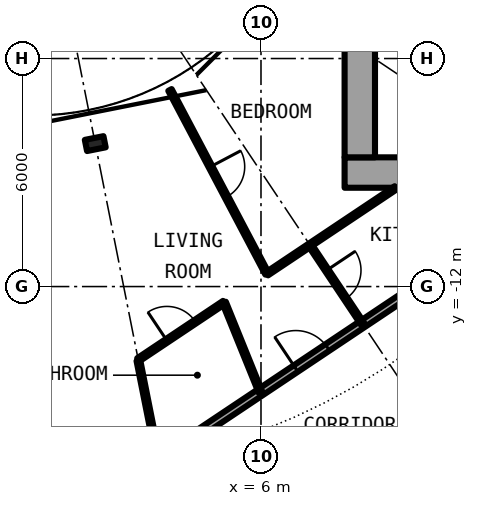
"""IFC4 building model, lengths in metres.
Left out: names, types, materials, properties, quantities, classifications, styles, units other than length and angle.
Written with IfcOpenShell. Run it as: python <this file> out.ifc"""

import sys

from ifc_helpers import new_model, si_unit, direction, frame, frame_2d, origin, origin_2d, place, context, subcontext, project, spatial, rectangle, i_section, extrude, element, fill, save


model = new_model("IFC4")
c1 = context("Model", 3, precision=1e-05, world=origin(), true_north=direction((0.0, 1.0)))
c2 = subcontext(c1, "Body", "Model", "MODEL_VIEW")
j1 = project(units=[si_unit("LENGTHUNIT", "METRE"), si_unit("PLANEANGLEUNIT", "RADIAN")], contexts=[c1])
p1 = place(None, origin())
s1 = spatial("IfcSite", under=j1, at=p1, CompositionType="ELEMENT")
p2 = place(p1, origin())
s2 = spatial("IfcBuilding", under=s1, at=p2, CompositionType="ELEMENT")
p3 = place(p2, frame((0.0, 0.0, 31.95)))
s3 = spatial("IfcBuildingStorey", under=s2, at=p3, CompositionType="ELEMENT", Elevation=31.95)
p4 = place(p3, frame((1.639, -8.239, 0.0), z_axis=(0.0, 0.0, 1.0), x_axis=(0.195090322016, -0.980785280403, 0.0)))
e1 = element("IfcColumn", 1, at=p4, inside=s3, PredefinedType="COLUMN", context=c2, shape_type="SweptSolid", body=[
    extrude(i_section(OverallWidth=0.3, OverallDepth=0.5, WebThickness=0.014, FlangeThickness=0.028, FilletRadius=0.027, at=origin_2d()), origin(), (0.0, 0.0, 1.0), 3.05),
])
p5 = place(p3, frame((8.2, -9.0, 0.0), z_axis=(0.0, 0.0, 1.0), x_axis=(1.0, 0.0, 0.0)))
e2 = element("IfcWall", 2, at=p5, inside=s3, PredefinedType="SHEAR", context=c2, shape_type="SweptSolid", body=[
    extrude(rectangle(XDim=14.2, YDim=0.8, at=frame_2d((7.1, 0.0))), origin(), (0.0, 0.0, 1.0), 3.05),
])
p6 = place(p5, frame((11.675, 0.0, 0.0)))
e3 = element("IfcOpeningElement", 3, at=p6, cuts=e2, PredefinedType="OPENING", context=c2, shape_type="SweptSolid", body=[
    extrude(rectangle(XDim=1.2, YDim=2.3, at=frame_2d((0.6, 1.15))), frame((0.0, 0.41, 0.0), z_axis=(0.0, -1.0, 0.0), x_axis=(1.0, 0.0, 0.0)), (0.0, 0.0, 1.0), 0.82),
])
p7 = place(p3, frame((8.6, -8.6, 0.0), z_axis=(0.0, 0.0, 1.0), x_axis=(0.0, 1.0, 0.0)))
e4 = element("IfcWall", 4, at=p7, inside=s3, PredefinedType="SHEAR", context=c2, shape_type="SweptSolid", body=[
    extrude(rectangle(XDim=17.2, YDim=0.8, at=frame_2d((8.6, 0.0))), origin(), (0.0, 0.0, 1.0), 3.05),
])
p8 = place(p7, frame((7.4, 0.0, 0.1)))
e5 = element("IfcOpeningElement", 5, at=p8, cuts=e4, PredefinedType="OPENING", context=c2, shape_type="SweptSolid", body=[
    extrude(rectangle(XDim=2.4, YDim=2.2, at=frame_2d((1.2, 1.1))), frame((0.0, 0.41, 0.0), z_axis=(0.0, -1.0, 0.0), x_axis=(1.0, 0.0, 0.0)), (0.0, 0.0, 1.0), 0.82),
])
p9 = place(p3, frame((9.239, -17.286, 0.0), z_axis=(0.0, 0.0, 1.0), x_axis=(0.74089212117, 0.671624050186, 0.0)))
e6 = element("IfcWall", 6, at=p9, inside=s3, PredefinedType="PARTITIONING", context=c2, shape_type="SweptSolid", body=[
    extrude(rectangle(XDim=9.368, YDim=0.2, at=frame_2d((4.684, 0.0))), origin(), (0.0, 0.0, 1.0), 2.38),
])
p10 = place(p9, frame((5.215, 0.0, 0.0)))
e7 = element("IfcOpeningElement", 7, at=p10, cuts=e6, PredefinedType="OPENING", context=c2, shape_type="SweptSolid", body=[
    extrude(rectangle(XDim=1.0, YDim=2.3, at=frame_2d((0.5, 1.15))), frame((0.0, 0.11, 0.0), z_axis=(0.0, -1.0, 0.0), x_axis=(1.0, 0.0, 0.0)), (0.0, 0.0, 1.0), 0.22),
])
p11 = place(p3, frame((3.297, -16.575, 0.0), z_axis=(0.0, 0.0, 1.0), x_axis=(0.831561346449, 0.555432918625, 0.0)))
e8 = element("IfcWall", 8, at=p11, inside=s3, PredefinedType="PARTITIONING", context=c2, shape_type="SweptSolid", body=[
    extrude(rectangle(XDim=12.914, YDim=0.2, at=frame_2d((6.457, 0.0))), origin(), (0.0, 0.0, 1.0), 2.7),
])
p12 = place(p11, frame((4.352, 0.0, 0.0)))
e9 = element("IfcOpeningElement", 9, at=p12, cuts=e8, PredefinedType="OPENING", context=c2, shape_type="SweptSolid", body=[
    extrude(rectangle(XDim=1.0, YDim=2.3, at=frame_2d((0.5, 1.15))), frame((0.0, 0.11, 0.0), z_axis=(0.0, -1.0, 0.0), x_axis=(1.0, 0.0, 0.0)), (0.0, 0.0, 1.0), 0.22),
])
p13 = place(p3, frame((2.77, -13.927, 0.0), z_axis=(0.0, 0.0, 1.0), x_axis=(0.831538390496, 0.555467285384, 0.0)))
e10 = element("IfcWall", 10, at=p13, inside=s3, PredefinedType="PARTITIONING", context=c2, shape_type="SweptSolid", body=[
    extrude(rectangle(XDim=2.717, YDim=0.1, at=frame_2d((1.358, 0.0))), origin(), (0.0, 0.0, 1.0), 2.7),
])
p14 = place(p13, frame((0.908, 0.0, 0.0)))
e11 = element("IfcOpeningElement", 11, at=p14, cuts=e10, PredefinedType="OPENING", context=c2, shape_type="SweptSolid", body=[
    extrude(rectangle(XDim=0.9, YDim=2.3, at=frame_2d((0.45, 1.15))), frame((0.0, 0.06, 0.0), z_axis=(0.0, -1.0, 0.0), x_axis=(1.0, 0.0, 0.0)), (0.0, 0.0, 1.0), 0.12),
])
p15 = place(p3, frame((6.158, -11.664, 0.0), z_axis=(0.0, 0.0, 1.0), x_axis=(0.831459707426, 0.555585056429, 0.0)))
e12 = element("IfcWall", 12, at=p15, inside=s3, PredefinedType="PARTITIONING", context=c2, shape_type="SweptSolid", body=[
    extrude(rectangle(XDim=4.073, YDim=0.1, at=frame_2d((2.037, 0.0))), origin(), (0.0, 0.0, 1.0), 2.7),
])
p16 = place(p3, frame((3.605, -6.827, 0.0), z_axis=(0.0, 0.0, 1.0), x_axis=(0.466976820365, -0.884269556889, 0.0)))
e13 = element("IfcWall", 13, at=p16, inside=s3, PredefinedType="PARTITIONING", context=c2, shape_type="SweptSolid", body=[
    extrude(rectangle(XDim=5.469, YDim=0.1, at=frame_2d((2.735, 0.0))), origin(), (0.0, 0.0, 1.0), 2.7),
])
p17 = place(p16, frame((2.284, 0.0, 0.0)))
e14 = element("IfcOpeningElement", 14, at=p17, cuts=e13, PredefinedType="OPENING", context=c2, shape_type="SweptSolid", body=[
    extrude(rectangle(XDim=0.9, YDim=2.3, at=frame_2d((0.45, 1.15))), frame((0.0, 0.06, 0.0), z_axis=(0.0, -1.0, 0.0), x_axis=(1.0, 0.0, 0.0)), (0.0, 0.0, 1.0), 0.12),
])
p18 = place(p3, frame((5.029, -12.418, 0.0), z_axis=(0.0, 0.0, 1.0), x_axis=(0.375649498413, -0.926761811008, 0.0)))
e15 = element("IfcWall", 15, at=p18, inside=s3, PredefinedType="PARTITIONING", context=c2, shape_type="SweptSolid", body=[
    extrude(rectangle(XDim=2.548, YDim=0.1, at=frame_2d((1.274, 0.0))), origin(), (0.0, 0.0, 1.0), 2.7),
])
p19 = place(p3, frame((7.289, -10.908, 0.0), z_axis=(0.0, 0.0, 1.0), x_axis=(0.555355163998, -0.831613276602, 0.0)))
e16 = element("IfcWall", 16, at=p19, inside=s3, PredefinedType="PARTITIONING", context=c2, shape_type="SweptSolid", body=[
    extrude(rectangle(XDim=2.494, YDim=0.1, at=frame_2d((1.247, 0.0))), origin(), (0.0, 0.0, 1.0), 2.7),
])
p20 = place(p19, frame((0.797, 0.0, 0.0)))
e17 = element("IfcOpeningElement", 17, at=p20, cuts=e16, PredefinedType="OPENING", context=c2, shape_type="SweptSolid", body=[
    extrude(rectangle(XDim=0.9, YDim=2.3, at=frame_2d((0.45, 1.15))), frame((0.0, 0.06, 0.0), z_axis=(0.0, -1.0, 0.0), x_axis=(1.0, 0.0, 0.0)), (0.0, 0.0, 1.0), 0.12),
])
p21 = place(p3, frame((3.293, -16.554, 0.0), z_axis=(0.0, 0.0, 1.0), x_axis=(-0.195338620417, 0.980735858105, 0.0)))
e18 = element("IfcWall", 18, at=p21, inside=s3, PredefinedType="PARTITIONING", context=c2, shape_type="SweptSolid", body=[
    extrude(rectangle(XDim=2.657, YDim=0.1, at=frame_2d((1.329, 0.0))), origin(), (0.0, 0.0, 1.0), 2.7),
])
p22 = place(p12, origin())
e19 = element("IfcDoor", 19, at=p22, inside=s3, OperationType="SINGLE_SWING_LEFT", PredefinedType="DOOR", context=c2, shape_type="SweptSolid", body=[
    extrude(rectangle(XDim=1.0, YDim=2.3, at=frame_2d((0.5, 1.15))), frame((0.0, 0.025, 0.0), z_axis=(0.0, -1.0, 0.0), x_axis=(1.0, 0.0, 0.0)), (0.0, 0.0, 1.0), 0.05),
])
fill(e9, e19)
p23 = place(p14, origin())
e20 = element("IfcDoor", 20, at=p23, inside=s3, OperationType="SINGLE_SWING_RIGHT", PredefinedType="DOOR", context=c2, shape_type="SweptSolid", body=[
    extrude(rectangle(XDim=0.9, YDim=2.3, at=frame_2d((0.45, 1.15))), frame((0.0, 0.025, 0.0), z_axis=(0.0, -1.0, 0.0), x_axis=(1.0, 0.0, 0.0)), (0.0, 0.0, 1.0), 0.05),
])
fill(e11, e20)
p24 = place(p20, origin())
e21 = element("IfcDoor", 21, at=p24, inside=s3, OperationType="SINGLE_SWING_RIGHT", PredefinedType="DOOR", context=c2, shape_type="SweptSolid", body=[
    extrude(rectangle(XDim=0.9, YDim=2.3, at=frame_2d((0.45, 1.15))), frame((0.0, 0.025, 0.0), z_axis=(0.0, -1.0, 0.0), x_axis=(1.0, 0.0, 0.0)), (0.0, 0.0, 1.0), 0.05),
])
fill(e17, e21)
p25 = place(p17, origin())
e22 = element("IfcDoor", 22, at=p25, inside=s3, OperationType="SINGLE_SWING_RIGHT", PredefinedType="DOOR", context=c2, shape_type="SweptSolid", body=[
    extrude(rectangle(XDim=0.9, YDim=2.3, at=frame_2d((0.45, 1.15))), frame((0.0, 0.025, 0.0), z_axis=(0.0, -1.0, 0.0), x_axis=(1.0, 0.0, 0.0)), (0.0, 0.0, 1.0), 0.05),
])
fill(e14, e22)
save(model, sys.argv[1])
